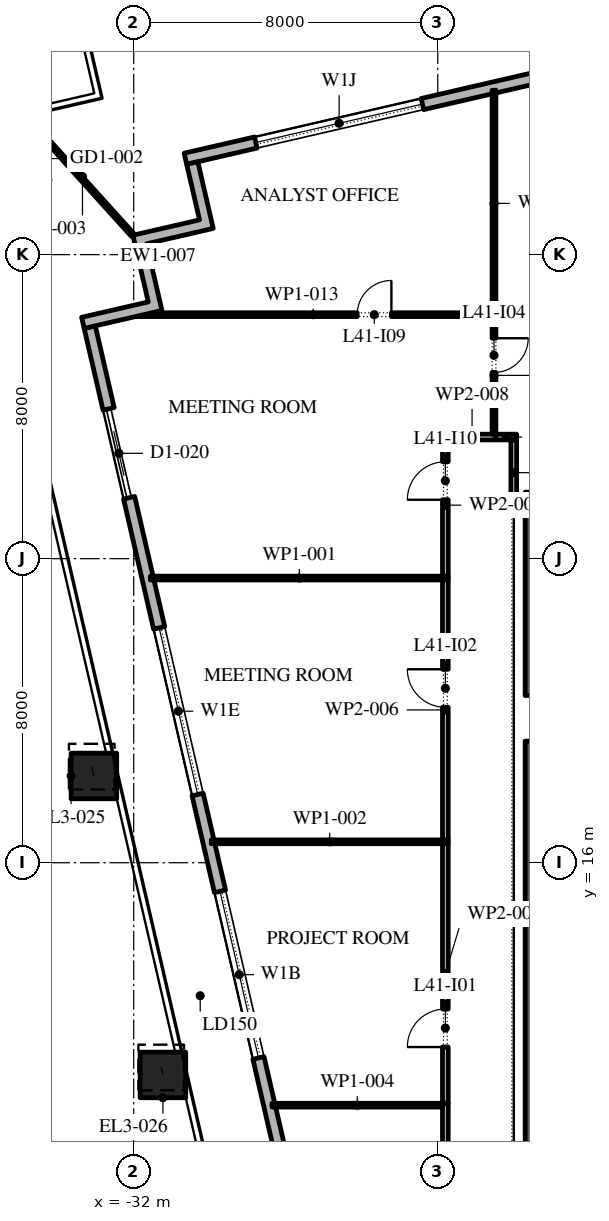
"""IFC4 building model, lengths in metres.
Left out: names, types, materials, properties, quantities, classifications, styles, units other than length and angle.
Written with IfcOpenShell. Run it as: python <this file> out.ifc"""

import sys

from ifc_helpers import new_model, si_unit, direction, frame, frame_2d, origin, origin_2d, place, context, subcontext, project, spatial, polyline, rectangle, outline, extrude, element, fill, save


model = new_model("IFC4")
c1 = context("Model", 3, precision=1e-05, world=origin(), true_north=direction((0.0, 1.0)))
c2 = subcontext(c1, "Body", "Model", "MODEL_VIEW")
j1 = project(units=[si_unit("LENGTHUNIT", "METRE"), si_unit("PLANEANGLEUNIT", "RADIAN")], contexts=[c1])
p1 = place(None, origin())
s1 = spatial("IfcSite", under=j1, at=p1, CompositionType="ELEMENT")
p2 = place(p1, origin())
s2 = spatial("IfcBuilding", under=s1, at=p2, CompositionType="ELEMENT")
p3 = place(p2, frame((0.0, 0.0, 188.4)))
s3 = spatial("IfcBuildingStorey", under=s2, at=p3, CompositionType="ELEMENT", Elevation=188.4)
p4 = place(p3, frame((-33.048, 18.283, 0.0), z_axis=(-0.013461020192, 0.058369768591, 0.998204273208), x_axis=(-0.974423835271, -0.224718021653, 0.0)))
e1 = element("IfcColumn", 1, at=p4, inside=s3, PredefinedType="COLUMN", context=c2, shape_type="SweptSolid", body=[
    extrude(rectangle(XDim=1.2, YDim=1.2, at=origin_2d()), origin(), (0.0, 0.0, 1.0), 4.208),
])
p5 = place(p3, frame((-31.232, 10.416, 0.0), z_axis=(-0.01079899337, 0.046737578833, 0.998848827635), x_axis=(-0.974329962248, -0.225124686929, 0.0)))
e2 = element("IfcColumn", 2, at=p5, inside=s3, PredefinedType="COLUMN", context=c2, shape_type="SweptSolid", body=[
    extrude(rectangle(XDim=1.2, YDim=1.2, at=origin_2d()), origin(), (0.0, 0.0, 1.0), 4.205),
])
p6 = place(p3, frame((17.592, 45.657, 0.0), z_axis=(0.0, 0.0, 1.0), x_axis=(-0.974370243697, -0.224950279389, 0.0)))
e3 = element("IfcWall", 3, at=p6, inside=s3, PredefinedType="STANDARD", context=c2, shape_type="SweptSolid", body=[
    extrude(rectangle(XDim=49.5, YDim=0.3, at=frame_2d((24.75, 0.0))), origin(), (0.0, 0.0, 1.0), 4.0),
])
p7 = place(p6, frame((2.8, 0.0, 0.0)))
e4 = element("IfcOpeningElement", 4, at=p7, cuts=e3, PredefinedType="OPENING", context=c2, shape_type="SweptSolid", body=[
    extrude(rectangle(XDim=2.4, YDim=3.5, at=frame_2d((1.2, 1.75))), frame((0.0, 0.16, 0.0), z_axis=(0.0, -1.0, 0.0), x_axis=(1.0, 0.0, 0.0)), (0.0, 0.0, 1.0), 0.32),
])
p8 = place(p6, frame((9.9, 0.0, 0.45)))
e5 = element("IfcOpeningElement", 5, at=p8, cuts=e3, PredefinedType="OPENING", context=c2, shape_type="SweptSolid", body=[
    extrude(rectangle(XDim=4.5, YDim=2.45, at=frame_2d((2.25, 1.225))), frame((0.0, 0.16, 0.0), z_axis=(0.0, -1.0, 0.0), x_axis=(1.0, 0.0, 0.0)), (0.0, 0.0, 1.0), 0.32),
])
p9 = place(p6, frame((18.2, 0.0, 0.45)))
e6 = element("IfcOpeningElement", 6, at=p9, cuts=e3, PredefinedType="OPENING", context=c2, shape_type="SweptSolid", body=[
    extrude(rectangle(XDim=4.5, YDim=2.45, at=frame_2d((2.25, 1.225))), frame((0.0, 0.16, 0.0), z_axis=(0.0, -1.0, 0.0), x_axis=(1.0, 0.0, 0.0)), (0.0, 0.0, 1.0), 0.32),
])
p10 = place(p6, frame((26.5, 0.0, 0.45)))
e7 = element("IfcOpeningElement", 7, at=p10, cuts=e3, PredefinedType="OPENING", context=c2, shape_type="SweptSolid", body=[
    extrude(rectangle(XDim=4.5, YDim=2.525, at=frame_2d((2.25, 1.262))), frame((0.0, 0.16, 0.0), z_axis=(0.0, -1.0, 0.0), x_axis=(1.0, 0.0, 0.0)), (0.0, 0.0, 1.0), 0.32),
])
p11 = place(p6, frame((35.85, 0.0, 0.0)))
e8 = element("IfcOpeningElement", 8, at=p11, cuts=e3, PredefinedType="OPENING", context=c2, shape_type="SweptSolid", body=[
    extrude(rectangle(XDim=2.4, YDim=3.5, at=frame_2d((1.2, 1.75))), frame((0.0, 0.16, 0.0), z_axis=(0.0, -1.0, 0.0), x_axis=(1.0, 0.0, 0.0)), (0.0, 0.0, 1.0), 0.32),
])
p12 = place(p6, frame((43.1, 0.0, 0.45)))
e9 = element("IfcOpeningElement", 9, at=p12, cuts=e3, PredefinedType="OPENING", context=c2, shape_type="SweptSolid", body=[
    extrude(rectangle(XDim=4.5, YDim=2.675, at=frame_2d((2.25, 1.337))), frame((0.0, 0.16, 0.0), z_axis=(0.0, -1.0, 0.0), x_axis=(1.0, 0.0, 0.0)), (0.0, 0.0, 1.0), 0.32),
])
p13 = place(p3, frame((-33.157, 30.092, 0.0), z_axis=(0.0, 0.0, 1.0), x_axis=(0.224950279389, -0.974370243697, 0.0)))
e10 = element("IfcWall", 10, at=p13, inside=s3, PredefinedType="STANDARD", context=c2, shape_type="SweptSolid", body=[
    extrude(rectangle(XDim=49.5, YDim=0.3, at=frame_2d((24.75, 0.0))), origin(), (0.0, 0.0, 1.0), 4.0),
])
p14 = place(p13, frame((2.207, 0.0, 0.0)))
e11 = element("IfcOpeningElement", 11, at=p14, cuts=e10, PredefinedType="OPENING", context=c2, shape_type="SweptSolid", body=[
    extrude(rectangle(XDim=2.4, YDim=3.5, at=frame_2d((1.2, 1.75))), frame((0.0, 0.16, 0.0), z_axis=(0.0, -1.0, 0.0), x_axis=(1.0, 0.0, 0.0)), (0.0, 0.0, 1.0), 0.32),
])
p15 = place(p13, frame((8.121, 0.0, 0.45)))
e12 = element("IfcOpeningElement", 12, at=p15, cuts=e10, PredefinedType="OPENING", context=c2, shape_type="SweptSolid", body=[
    extrude(rectangle(XDim=4.5, YDim=2.825, at=frame_2d((2.25, 1.413))), frame((0.0, 0.16, 0.0), z_axis=(0.0, -1.0, 0.0), x_axis=(1.0, 0.0, 0.0)), (0.0, 0.0, 1.0), 0.32),
])
p16 = place(p13, frame((15.236, 0.0, 0.45)))
e13 = element("IfcOpeningElement", 13, at=p16, cuts=e10, PredefinedType="OPENING", context=c2, shape_type="SweptSolid", body=[
    extrude(rectangle(XDim=4.5, YDim=2.95, at=frame_2d((2.25, 1.475))), frame((0.0, 0.16, 0.0), z_axis=(0.0, -1.0, 0.0), x_axis=(1.0, 0.0, 0.0)), (0.0, 0.0, 1.0), 0.32),
])
p17 = place(p13, frame((22.35, 0.0, 0.45)))
e14 = element("IfcOpeningElement", 14, at=p17, cuts=e10, PredefinedType="OPENING", context=c2, shape_type="SweptSolid", body=[
    extrude(rectangle(XDim=4.5, YDim=3.0, at=frame_2d((2.25, 1.5))), frame((0.0, 0.16, 0.0), z_axis=(0.0, -1.0, 0.0), x_axis=(1.0, 0.0, 0.0)), (0.0, 0.0, 1.0), 0.32),
])
p18 = place(p13, frame((30.514, 0.0, 0.0)))
e15 = element("IfcOpeningElement", 15, at=p18, cuts=e10, PredefinedType="OPENING", context=c2, shape_type="SweptSolid", body=[
    extrude(rectangle(XDim=2.4, YDim=3.5, at=frame_2d((1.2, 1.75))), frame((0.0, 0.16, 0.0), z_axis=(0.0, -1.0, 0.0), x_axis=(1.0, 0.0, 0.0)), (0.0, 0.0, 1.0), 0.32),
])
p19 = place(p13, frame((36.579, 0.0, 0.45)))
e16 = element("IfcOpeningElement", 16, at=p19, cuts=e10, PredefinedType="OPENING", context=c2, shape_type="SweptSolid", body=[
    extrude(rectangle(XDim=4.5, YDim=3.05, at=frame_2d((2.25, 1.525))), frame((0.0, 0.16, 0.0), z_axis=(0.0, -1.0, 0.0), x_axis=(1.0, 0.0, 0.0)), (0.0, 0.0, 1.0), 0.32),
])
p20 = place(p13, frame((43.693, 0.0, 0.45)))
e17 = element("IfcOpeningElement", 17, at=p20, cuts=e10, PredefinedType="OPENING", context=c2, shape_type="SweptSolid", body=[
    extrude(rectangle(XDim=4.5, YDim=3.05, at=frame_2d((2.25, 1.525))), frame((0.0, 0.16, 0.0), z_axis=(0.0, -1.0, 0.0), x_axis=(1.0, 0.0, 0.0)), (0.0, 0.0, 1.0), 0.32),
])
p21 = place(p3, origin())
e18 = element("IfcWall", 18, at=p21, inside=s3, PredefinedType="STANDARD", context=c2, shape_type="SweptSolid", body=[
    extrude(outline(polyline([(-31.617, 30.756), (-32.022, 32.51), (-30.268, 32.914), (-30.605, 34.376), (-30.313, 34.443), (-29.908, 32.69), (-31.662, 32.285), (-31.257, 30.531), (-33.303, 30.058), (-33.371, 30.351), (-31.617, 30.756)])), origin(), (0.0, 0.0, 1.0), 4.0),
])
p22 = place(p3, frame((-32.022, 32.51, -0.05), z_axis=(0.0, 0.0, 1.0), x_axis=(-0.670133848455, 0.742240274544, 0.0)))
e19 = element("IfcWall", 19, at=p22, inside=s3, PredefinedType="STANDARD", context=c2, shape_type="SweptSolid", body=[
    extrude(rectangle(XDim=4.07, YDim=0.1, at=frame_2d((2.035, 0.0))), origin(), (0.0, 0.0, 1.0), 4.05),
])
p23 = place(p3, frame((-21.35, -2.45, 0.0), z_axis=(0.0, 0.0, 1.0), x_axis=(0.0, 1.0, 0.0)))
e20 = element("IfcWall", 20, at=p23, inside=s3, PredefinedType="SHEAR", context=c2, shape_type="SweptSolid", body=[
    extrude(rectangle(XDim=27.9, YDim=0.7, at=frame_2d((13.95, 0.0))), origin(), (0.0, 0.0, 1.0), 4.0),
])
p24 = place(p23, frame((5.05, 0.0, 0.0)))
e21 = element("IfcOpeningElement", 21, at=p24, cuts=e20, PredefinedType="OPENING", context=c2, shape_type="SweptSolid", body=[
    extrude(rectangle(XDim=1.2, YDim=2.1, at=frame_2d((0.6, 1.05))), frame((0.0, 0.36, 0.0), z_axis=(0.0, -1.0, 0.0), x_axis=(1.0, 0.0, 0.0)), (0.0, 0.0, 1.0), 0.72),
])
p25 = place(p23, frame((21.65, 0.0, 0.0)))
e22 = element("IfcOpeningElement", 22, at=p25, cuts=e20, PredefinedType="OPENING", context=c2, shape_type="SweptSolid", body=[
    extrude(rectangle(XDim=1.2, YDim=2.1, at=frame_2d((0.6, 1.05))), frame((0.0, 0.36, 0.0), z_axis=(0.0, -1.0, 0.0), x_axis=(1.0, 0.0, 0.0)), (0.0, 0.0, 1.0), 0.72),
])
p26 = place(p3, frame((-21.7, 25.6, 0.0), z_axis=(0.0, 0.0, 1.0), x_axis=(1.0, 0.0, 0.0)))
e23 = element("IfcWall", 23, at=p26, inside=s3, PredefinedType="SHEAR", context=c2, shape_type="SweptSolid", body=[
    extrude(rectangle(XDim=11.4, YDim=0.3, at=frame_2d((5.7, 0.0))), origin(), (0.0, 0.0, 1.0), 4.0),
])
p27 = place(p3, frame((-31.562, 23.49, 0.0), z_axis=(0.0, 0.0, 1.0), x_axis=(1.0, 0.0, 0.0)))
e24 = element("IfcWall", 24, at=p27, inside=s3, PredefinedType="PARTITIONING", context=c2, shape_type="SweptSolid", body=[
    extrude(rectangle(XDim=7.837, YDim=0.1, at=frame_2d((3.918, 0.0))), origin(), (0.0, 0.0, 1.0), 4.0),
])
p28 = place(p3, frame((-29.959, 16.55, 0.0), z_axis=(0.0, 0.0, 1.0), x_axis=(1.0, 0.0, 0.0)))
e25 = element("IfcWall", 25, at=p28, inside=s3, PredefinedType="PARTITIONING", context=c2, shape_type="SweptSolid", body=[
    extrude(rectangle(XDim=6.234, YDim=0.1, at=frame_2d((3.117, 0.0))), origin(), (0.0, 0.0, 1.0), 4.0),
])
p29 = place(p3, frame((-23.8, -5.075, 0.0), z_axis=(0.0, 0.0, 1.0), x_axis=(0.0, 1.0, 0.0)))
e26 = element("IfcWall", 26, at=p29, inside=s3, PredefinedType="PARTITIONING", context=c2, shape_type="SweptSolid", body=[
    extrude(rectangle(XDim=14.745, YDim=0.15, at=frame_2d((7.373, 0.0))), origin(), (0.0, 0.0, 1.0), 4.0),
])
p30 = place(p29, frame((5.545, 0.0, 0.0)))
e27 = element("IfcOpeningElement", 27, at=p30, cuts=e26, PredefinedType="OPENING", context=c2, shape_type="SweptSolid", body=[
    extrude(rectangle(XDim=1.0, YDim=2.1, at=frame_2d((0.5, 1.05))), frame((0.0, 0.085, 0.0), z_axis=(0.0, -1.0, 0.0), x_axis=(1.0, 0.0, 0.0)), (0.0, 0.0, 1.0), 0.17),
])
p31 = place(p3, frame((-23.875, 9.62, 0.0), z_axis=(0.0, 0.0, 1.0), x_axis=(-1.0, 0.0, 0.0)))
e28 = element("IfcWall", 28, at=p31, inside=s3, PredefinedType="PARTITIONING", context=c2, shape_type="SweptSolid", body=[
    extrude(rectangle(XDim=4.485, YDim=0.1, at=frame_2d((2.243, 0.0))), origin(), (0.0, 0.0, 1.0), 4.0),
])
p32 = place(p3, frame((-23.8, 9.67, 0.0), z_axis=(0.0, 0.0, 1.0), x_axis=(0.0, 1.0, 0.0)))
e29 = element("IfcWall", 29, at=p32, inside=s3, PredefinedType="PARTITIONING", context=c2, shape_type="SweptSolid", body=[
    extrude(rectangle(XDim=6.83, YDim=0.15, at=frame_2d((3.415, 0.0))), origin(), (0.0, 0.0, 1.0), 4.0),
])
p33 = place(p32, frame((1.48, 0.0, 0.0)))
e30 = element("IfcOpeningElement", 30, at=p33, cuts=e29, PredefinedType="OPENING", context=c2, shape_type="SweptSolid", body=[
    extrude(rectangle(XDim=1.0, YDim=2.1, at=frame_2d((0.5, 1.05))), frame((0.0, 0.085, 0.0), z_axis=(0.0, -1.0, 0.0), x_axis=(1.0, 0.0, 0.0)), (0.0, 0.0, 1.0), 0.17),
])
p34 = place(p3, frame((-23.8, 16.6, 0.0), z_axis=(0.0, 0.0, 1.0), x_axis=(0.0, 1.0, 0.0)))
e31 = element("IfcWall", 31, at=p34, inside=s3, PredefinedType="PARTITIONING", context=c2, shape_type="SweptSolid", body=[
    extrude(rectangle(XDim=6.84, YDim=0.15, at=frame_2d((3.42, 0.0))), origin(), (0.0, 0.0, 1.0), 4.0),
])
p35 = place(p34, frame((3.49, 0.0, 0.0)))
e32 = element("IfcOpeningElement", 32, at=p35, cuts=e31, PredefinedType="OPENING", context=c2, shape_type="SweptSolid", body=[
    extrude(rectangle(XDim=1.0, YDim=2.1, at=frame_2d((0.5, 1.05))), frame((0.0, 0.085, 0.0), z_axis=(0.0, -1.0, 0.0), x_axis=(1.0, 0.0, 0.0)), (0.0, 0.0, 1.0), 0.17),
])
p36 = place(p3, frame((-23.8, 23.54, 0.0), z_axis=(0.0, 0.0, 1.0), x_axis=(0.0, 1.0, 0.0)))
e33 = element("IfcWall", 33, at=p36, inside=s3, PredefinedType="PARTITIONING", context=c2, shape_type="SweptSolid", body=[
    extrude(rectangle(XDim=3.735, YDim=0.15, at=frame_2d((1.867, 0.0))), origin(), (0.0, 0.0, 1.0), 4.0),
])
p37 = place(p36, frame((2.01, 0.0, 0.0)))
e34 = element("IfcOpeningElement", 34, at=p37, cuts=e33, PredefinedType="OPENING", context=c2, shape_type="SweptSolid", body=[
    extrude(rectangle(XDim=1.0, YDim=2.1, at=frame_2d((0.5, 1.05))), frame((0.0, 0.085, 0.0), z_axis=(0.0, -1.0, 0.0), x_axis=(1.0, 0.0, 0.0)), (0.0, 0.0, 1.0), 0.17),
])
p38 = place(p3, frame((-23.725, 27.2, 0.0), z_axis=(0.0, 0.0, 1.0), x_axis=(1.0, 0.0, 0.0)))
e35 = element("IfcWall", 35, at=p38, inside=s3, PredefinedType="PARTITIONING", context=c2, shape_type="SweptSolid", body=[
    extrude(rectangle(XDim=1.255, YDim=0.15, at=frame_2d((0.627, 0.0))), origin(), (0.0, 0.0, 1.0), 4.0),
])
p39 = place(p3, frame((-22.52, 27.275, 0.0), z_axis=(0.0, 0.0, 1.0), x_axis=(0.0, 1.0, 0.0)))
e36 = element("IfcWall", 36, at=p39, inside=s3, PredefinedType="PARTITIONING", context=c2, shape_type="SweptSolid", body=[
    extrude(rectangle(XDim=3.095, YDim=0.1, at=frame_2d((1.548, 0.0))), origin(), (0.0, 0.0, 1.0), 4.0),
])
p40 = place(p39, frame((1.625, 0.0, 0.0)))
e37 = element("IfcOpeningElement", 37, at=p40, cuts=e36, PredefinedType="OPENING", context=c2, shape_type="SweptSolid", body=[
    extrude(rectangle(XDim=0.9, YDim=2.1, at=frame_2d((0.45, 1.05))), frame((0.0, 0.06, 0.0), z_axis=(0.0, -1.0, 0.0), x_axis=(1.0, 0.0, 0.0)), (0.0, 0.0, 1.0), 0.12),
])
p41 = place(p3, frame((-22.47, 27.2, 0.0), z_axis=(0.0, 0.0, 1.0), x_axis=(1.0, 0.0, 0.0)))
e38 = element("IfcWall", 38, at=p41, inside=s3, PredefinedType="PARTITIONING", context=c2, shape_type="SweptSolid", body=[
    extrude(rectangle(XDim=0.545, YDim=0.15, at=frame_2d((0.272, 0.0))), origin(), (0.0, 0.0, 1.0), 4.0),
])
p42 = place(p3, frame((-22.57, 30.42, 0.0), z_axis=(0.0, 0.0, 1.0), x_axis=(-1.0, 0.0, 0.0)))
e39 = element("IfcWall", 39, at=p42, inside=s3, PredefinedType="PARTITIONING", context=c2, shape_type="SweptSolid", body=[
    extrude(rectangle(XDim=9.412, YDim=0.1, at=frame_2d((4.706, 0.0))), origin(), (0.0, 0.0, 1.0), 4.0),
])
p43 = place(p42, frame((2.65, 0.0, 0.0)))
e40 = element("IfcOpeningElement", 40, at=p43, cuts=e39, PredefinedType="OPENING", context=c2, shape_type="SweptSolid", body=[
    extrude(rectangle(XDim=0.9, YDim=2.1, at=frame_2d((0.45, 1.05))), frame((0.0, 0.06, 0.0), z_axis=(0.0, -1.0, 0.0), x_axis=(1.0, 0.0, 0.0)), (0.0, 0.0, 1.0), 0.12),
])
p44 = place(p3, frame((-22.52, 30.37, 0.0), z_axis=(0.0, 0.0, 1.0), x_axis=(0.0, 1.0, 0.0)))
e41 = element("IfcWall", 41, at=p44, inside=s3, PredefinedType="PARTITIONING", context=c2, shape_type="SweptSolid", body=[
    extrude(rectangle(XDim=5.955, YDim=0.1, at=frame_2d((2.978, 0.0))), origin(), (0.0, 0.0, 1.0), 4.0),
])
p45 = place(p3, frame((-22.47, 30.42, 0.0), z_axis=(0.0, 0.0, 1.0), x_axis=(1.0, 0.0, 0.0)))
e42 = element("IfcWall", 42, at=p45, inside=s3, PredefinedType="PARTITIONING", context=c2, shape_type="SweptSolid", body=[
    extrude(rectangle(XDim=9.02, YDim=0.1, at=frame_2d((4.51, 0.0))), origin(), (0.0, 0.0, 1.0), 4.0),
])
p46 = place(p3, frame((-22.0, 27.125, 0.0), z_axis=(0.0, 0.0, 1.0), x_axis=(0.0, -1.0, 0.0)))
e43 = element("IfcWall", 43, at=p46, inside=s3, PredefinedType="PARTITIONING", context=c2, shape_type="SweptSolid", body=[
    extrude(rectangle(XDim=1.725, YDim=0.15, at=frame_2d((0.863, 0.0))), origin(), (0.0, 0.0, 1.0), 4.0),
])
p47 = place(p12, origin())
e44 = element("IfcWindow", 44, at=p47, inside=s3, PartitioningType="DOUBLE_PANEL_VERTICAL", PredefinedType="WINDOW", context=c2, shape_type="SweptSolid", body=[
    extrude(rectangle(XDim=4.5, YDim=2.675, at=frame_2d((2.25, 1.337))), frame((0.0, 0.03, 0.0), z_axis=(0.0, -1.0, 0.0), x_axis=(1.0, 0.0, 0.0)), (0.0, 0.0, 1.0), 0.06),
])
fill(e9, e44)
p48 = place(p14, origin())
e45 = element("IfcDoor", 45, at=p48, inside=s3, OperationType="DOUBLE_DOOR_SLIDING", PredefinedType="DOOR", context=c2, shape_type="SweptSolid", body=[
    extrude(rectangle(XDim=2.4, YDim=3.5, at=frame_2d((1.2, 1.75))), frame((0.0, 0.025, 0.0), z_axis=(0.0, -1.0, 0.0), x_axis=(1.0, 0.0, 0.0)), (0.0, 0.0, 1.0), 0.05),
])
fill(e11, e45)
p49 = place(p15, origin())
e46 = element("IfcWindow", 46, at=p49, inside=s3, PartitioningType="DOUBLE_PANEL_VERTICAL", PredefinedType="WINDOW", context=c2, shape_type="SweptSolid", body=[
    extrude(rectangle(XDim=4.5, YDim=2.825, at=frame_2d((2.25, 1.413))), frame((0.0, 0.03, 0.0), z_axis=(0.0, -1.0, 0.0), x_axis=(1.0, 0.0, 0.0)), (0.0, 0.0, 1.0), 0.06),
])
fill(e12, e46)
p50 = place(p16, origin())
e47 = element("IfcWindow", 47, at=p50, inside=s3, PartitioningType="DOUBLE_PANEL_VERTICAL", PredefinedType="WINDOW", context=c2, shape_type="SweptSolid", body=[
    extrude(rectangle(XDim=4.5, YDim=2.95, at=frame_2d((2.25, 1.475))), frame((0.0, 0.03, 0.0), z_axis=(0.0, -1.0, 0.0), x_axis=(1.0, 0.0, 0.0)), (0.0, 0.0, 1.0), 0.06),
])
fill(e13, e47)
p51 = place(p33, origin())
e48 = element("IfcDoor", 48, at=p51, inside=s3, OperationType="SINGLE_SWING_RIGHT", PredefinedType="DOOR", context=c2, shape_type="SweptSolid", body=[
    extrude(rectangle(XDim=1.0, YDim=2.1, at=frame_2d((0.5, 1.05))), frame((0.0, 0.025, 0.0), z_axis=(0.0, -1.0, 0.0), x_axis=(1.0, 0.0, 0.0)), (0.0, 0.0, 1.0), 0.05),
])
fill(e30, e48)
p52 = place(p35, origin())
e49 = element("IfcDoor", 49, at=p52, inside=s3, OperationType="SINGLE_SWING_LEFT", PredefinedType="DOOR", context=c2, shape_type="SweptSolid", body=[
    extrude(rectangle(XDim=1.0, YDim=2.1, at=frame_2d((0.5, 1.05))), frame((0.0, 0.025, 0.0), z_axis=(0.0, -1.0, 0.0), x_axis=(1.0, 0.0, 0.0)), (0.0, 0.0, 1.0), 0.05),
])
fill(e32, e49)
p53 = place(p40, frame((0.9, 0.0, 0.0), z_axis=(0.0, 0.0, 1.0), x_axis=(-1.0, 0.0, 0.0)))
e50 = element("IfcDoor", 50, at=p53, inside=s3, OperationType="SINGLE_SWING_RIGHT", PredefinedType="DOOR", context=c2, shape_type="SweptSolid", body=[
    extrude(rectangle(XDim=0.9, YDim=2.1, at=frame_2d((0.45, 1.05))), frame((0.0, 0.025, 0.0), z_axis=(0.0, -1.0, 0.0), x_axis=(1.0, 0.0, 0.0)), (0.0, 0.0, 1.0), 0.05),
])
fill(e37, e50)
p54 = place(p43, frame((0.9, 0.0, 0.0), z_axis=(0.0, 0.0, 1.0), x_axis=(-1.0, 0.0, 0.0)))
e51 = element("IfcDoor", 51, at=p54, inside=s3, OperationType="SINGLE_SWING_LEFT", PredefinedType="DOOR", context=c2, shape_type="SweptSolid", body=[
    extrude(rectangle(XDim=0.9, YDim=2.1, at=frame_2d((0.45, 1.05))), frame((0.0, 0.025, 0.0), z_axis=(0.0, -1.0, 0.0), x_axis=(1.0, 0.0, 0.0)), (0.0, 0.0, 1.0), 0.05),
])
fill(e40, e51)
p55 = place(p37, origin())
e52 = element("IfcDoor", 52, at=p55, inside=s3, OperationType="SINGLE_SWING_RIGHT", PredefinedType="DOOR", context=c2, shape_type="SweptSolid", body=[
    extrude(rectangle(XDim=1.0, YDim=2.1, at=frame_2d((0.5, 1.05))), frame((0.0, 0.025, 0.0), z_axis=(0.0, -1.0, 0.0), x_axis=(1.0, 0.0, 0.0)), (0.0, 0.0, 1.0), 0.05),
])
fill(e34, e52)
save(model, sys.argv[1])
